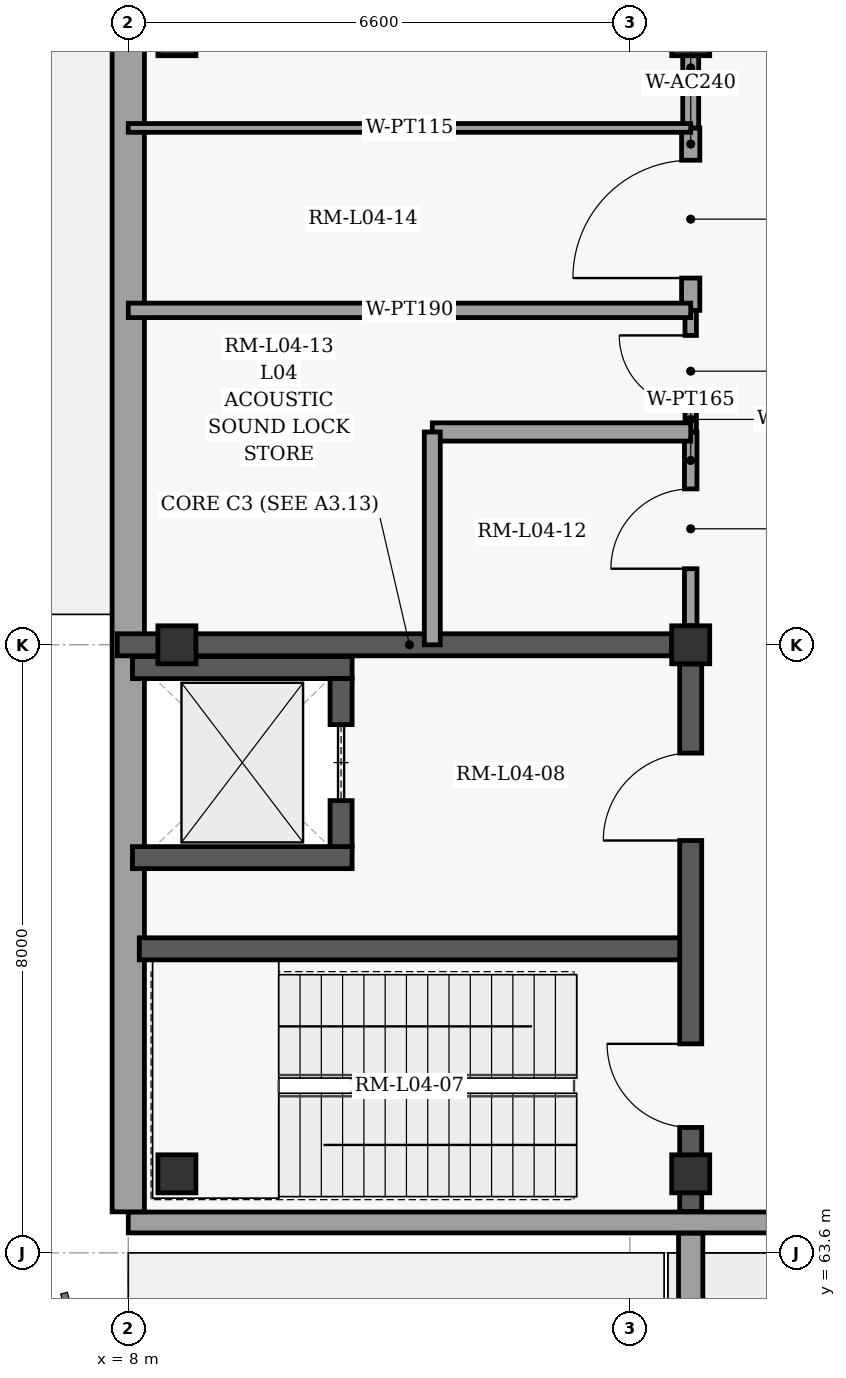
"""IFC4 building model, lengths in metres.
Left out: names, types, materials, properties, quantities, classifications, styles, units other than length and angle.
Written with IfcOpenShell. Run it as: python <this file> out.ifc"""

import sys

from ifc_helpers import new_model, si_unit, direction, frame, frame_2d, origin, origin_2d, place, context, subcontext, project, spatial, rectangle, extrude, element, fill, save


model = new_model("IFC4")
c1 = context("Model", 3, precision=1e-05, world=origin(), true_north=direction((0.0, 1.0)))
c2 = subcontext(c1, "Body", "Model", "MODEL_VIEW")
j1 = project(units=[si_unit("LENGTHUNIT", "METRE"), si_unit("PLANEANGLEUNIT", "RADIAN")], contexts=[c1])
p1 = place(None, origin())
s1 = spatial("IfcSite", under=j1, at=p1, CompositionType="ELEMENT")
p2 = place(p1, origin())
s2 = spatial("IfcBuilding", under=s1, at=p2, CompositionType="ELEMENT")
p3 = place(p2, frame((0.0, 0.0, 20.4)))
s3 = spatial("IfcBuildingStorey", under=s2, at=p3, CompositionType="ELEMENT", Elevation=20.4)
for number, where, z_axis, x_axis in (
    (1, (8.64, 64.64, 0.0), (0.0, 0.0, 1.0), (1.0, 0.0, 0.0)),
    (2, (8.64, 71.6, 0.0), (0.0, 0.0, 1.0), (1.0, 0.0, 0.0)),
    (3, (8.64, 79.6, 0.0), (0.0, 0.0, 1.0), (1.0, 0.0, 0.0)),
    (4, (15.4, 64.64, 0.0), (0.0, 0.0, 1.0), (1.0, 0.0, 0.0)),
    (5, (15.4, 71.6, 0.0), (0.0, 0.0, 1.0), (1.0, 0.0, 0.0)),
    (6, (15.4, 79.6, 0.0), (0.0, 0.0, 1.0), (1.0, 0.0, 0.0)),
):
    element("IfcColumn", number, at=place(p3, frame(where, z_axis=z_axis, x_axis=x_axis)), inside=s3, PredefinedType="COLUMN", context=c2, shape_type="SweptSolid", body=[
        extrude(rectangle(XDim=0.5, YDim=0.5, at=origin_2d()), origin(), (0.0, 0.0, 1.0), 4.5),
    ])
p4 = place(p3, frame((33.6, 64.0, 0.0), z_axis=(0.0, 0.0, 1.0), x_axis=(-1.0, 0.0, 0.0)))
e7 = element("IfcWall", 7, at=p4, inside=s3, PredefinedType="SOLIDWALL", context=c2, shape_type="SweptSolid", body=[
    extrude(rectangle(XDim=25.6, YDim=0.275, at=frame_2d((12.8, 0.0))), origin(), (0.0, 0.0, 1.0), 4.28),
])
p5 = place(p3, frame((8.0, 64.14, 0.0), z_axis=(0.0, 0.0, 1.0), x_axis=(0.0, 1.0, 0.0)))
e8 = element("IfcWall", 8, at=p5, inside=s3, PredefinedType="SOLIDWALL", context=c2, shape_type="SweptSolid", body=[
    extrude(rectangle(XDim=29.72, YDim=0.425, at=frame_2d((14.86, 0.0))), origin(), (0.0, 0.0, 1.0), 4.28),
])
p6 = place(p3, frame((15.4, 60.948, -1.44), z_axis=(0.0, 0.0, 1.0), x_axis=(0.0, 1.0, 0.0)))
e9 = element("IfcWall", 9, at=p6, inside=s3, PredefinedType="SOLIDWALL", context=c2, shape_type="SweptSolid", body=[
    extrude(rectangle(XDim=2.91, YDim=0.32, at=frame_2d((1.455, 0.0))), origin(), (0.0, 0.0, 1.0), 2.08),
])
p7 = place(p3, frame((7.855, 71.6, 0.0), z_axis=(0.0, 0.0, 1.0), x_axis=(1.0, 0.0, 0.0)))
e10 = element("IfcWall", 10, at=p7, inside=s3, PredefinedType="SHEAR", context=c2, shape_type="SweptSolid", body=[
    extrude(rectangle(XDim=7.293, YDim=0.29, at=frame_2d((3.646, 0.0))), origin(), (0.0, 0.0, 1.0), 4.28),
])
p8 = place(p3, frame((15.4, 64.145, 0.0), z_axis=(0.0, 0.0, 1.0), x_axis=(0.0, 1.0, 0.0)))
e11 = element("IfcWall", 11, at=p8, inside=s3, PredefinedType="SHEAR", context=c2, shape_type="SweptSolid", body=[
    extrude(rectangle(XDim=7.203, YDim=0.29, at=frame_2d((3.602, 0.0))), origin(), (0.0, 0.0, 1.0), 4.28),
])
p9 = place(p8, frame((1.105, 0.0, 0.0)))
e12 = element("IfcOpeningElement", 12, at=p9, cuts=e11, PredefinedType="OPENING", context=c2, shape_type="SweptSolid", body=[
    extrude(rectangle(XDim=1.1, YDim=2.15, at=frame_2d((0.55, 1.075))), frame((0.0, 0.155, 0.0), z_axis=(0.0, -1.0, 0.0), x_axis=(1.0, 0.0, 0.0)), (0.0, 0.0, 1.0), 0.31),
])
p10 = place(p8, frame((4.88, 0.0, 0.0)))
e13 = element("IfcOpeningElement", 13, at=p10, cuts=e11, PredefinedType="OPENING", context=c2, shape_type="SweptSolid", body=[
    extrude(rectangle(XDim=1.15, YDim=2.2, at=frame_2d((0.575, 1.1))), frame((0.0, 0.155, 0.0), z_axis=(0.0, -1.0, 0.0), x_axis=(1.0, 0.0, 0.0)), (0.0, 0.0, 1.0), 0.31),
])
p11 = place(p3, frame((8.145, 67.6, 0.0), z_axis=(0.0, 0.0, 1.0), x_axis=(1.0, 0.0, 0.0)))
e14 = element("IfcWall", 14, at=p11, inside=s3, PredefinedType="SHEAR", context=c2, shape_type="SweptSolid", body=[
    extrude(rectangle(XDim=7.11, YDim=0.29, at=frame_2d((3.555, 0.0))), origin(), (0.0, 0.0, 1.0), 4.28),
])
for number, where, z_axis, x_axis in (
    (15, (8.055, 68.8, 0.0), (0.0, 0.0, 1.0), (1.0, 0.0, 0.0)),
    (16, (8.055, 71.3, 0.0), (0.0, 0.0, 1.0), (1.0, 0.0, 0.0)),
):
    element("IfcWall", number, at=place(p3, frame(where, z_axis=z_axis, x_axis=x_axis)), inside=s3, PredefinedType="SHEAR", context=c2, shape_type="SweptSolid", body=[
        extrude(rectangle(XDim=2.89, YDim=0.29, at=frame_2d((1.445, 0.0))), origin(), (0.0, 0.0, 1.0), 4.28),
    ])
p12 = place(p3, frame((10.8, 68.945, 0.0), z_axis=(0.0, 0.0, 1.0), x_axis=(0.0, 1.0, 0.0)))
e17 = element("IfcWall", 17, at=p12, inside=s3, PredefinedType="SHEAR", context=c2, shape_type="SweptSolid", body=[
    extrude(rectangle(XDim=2.21, YDim=0.29, at=frame_2d((1.105, 0.0))), origin(), (0.0, 0.0, 1.0), 4.28),
])
p13 = place(p12, frame((0.605, 0.0, 0.0)))
e18 = element("IfcOpeningElement", 18, at=p13, cuts=e17, PredefinedType="OPENING", context=c2, shape_type="SweptSolid", body=[
    extrude(rectangle(XDim=1.0, YDim=2.15, at=frame_2d((0.5, 1.075))), frame((0.0, 0.155, 0.0), z_axis=(0.0, -1.0, 0.0), x_axis=(1.0, 0.0, 0.0)), (0.0, 0.0, 1.0), 0.31),
])
p14 = place(p3, frame((15.4, 71.852, 0.0), z_axis=(0.0, 0.0, 1.0), x_axis=(0.0, 1.0, 0.0)))
e19 = element("IfcWall", 19, at=p14, inside=s3, PredefinedType="PARTITIONING", context=c2, shape_type="SweptSolid", body=[
    extrude(rectangle(XDim=2.548, YDim=0.165, at=frame_2d((1.274, 0.0))), origin(), (0.0, 0.0, 1.0), 3.43),
])
p15 = place(p14, frame((0.749, 0.0, 0.0)))
e20 = element("IfcOpeningElement", 20, at=p15, cuts=e19, PredefinedType="OPENING", context=c2, shape_type="SweptSolid", body=[
    extrude(rectangle(XDim=1.05, YDim=2.15, at=frame_2d((0.525, 1.075))), frame((0.0, 0.093, 0.0), z_axis=(0.0, -1.0, 0.0), x_axis=(1.0, 0.0, 0.0)), (0.0, 0.0, 1.0), 0.185),
])
p16 = place(p3, frame((15.4, 74.4, 0.0), z_axis=(0.0, 0.0, 1.0), x_axis=(0.0, 1.0, 0.0)))
e21 = element("IfcWall", 21, at=p16, inside=s3, PredefinedType="PARTITIONING", context=c2, shape_type="SweptSolid", body=[
    extrude(rectangle(XDim=1.6, YDim=0.15, at=frame_2d((0.8, 0.0))), origin(), (0.0, 0.0, 1.0), 3.43),
])
p17 = place(p16, frame((0.33, 0.0, 0.0)))
e22 = element("IfcOpeningElement", 22, at=p17, cuts=e21, PredefinedType="OPENING", context=c2, shape_type="SweptSolid", body=[
    extrude(rectangle(XDim=0.94, YDim=2.15, at=frame_2d((0.47, 1.075))), frame((0.0, 0.085, 0.0), z_axis=(0.0, -1.0, 0.0), x_axis=(1.0, 0.0, 0.0)), (0.0, 0.0, 1.0), 0.17),
])
p18 = place(p3, frame((15.4, 76.0, 0.0), z_axis=(0.0, 0.0, 1.0), x_axis=(0.0, 1.0, 0.0)))
e23 = element("IfcWall", 23, at=p18, inside=s3, PredefinedType="PARTITIONING", context=c2, shape_type="SweptSolid", body=[
    extrude(rectangle(XDim=2.4, YDim=0.24, at=frame_2d((1.2, 0.0))), origin(), (0.0, 0.0, 1.0), 3.43),
])
p19 = place(p18, frame((0.425, 0.0, 0.0)))
e24 = element("IfcOpeningElement", 24, at=p19, cuts=e23, PredefinedType="OPENING", context=c2, shape_type="SweptSolid", body=[
    extrude(rectangle(XDim=1.55, YDim=2.25, at=frame_2d((0.775, 1.125))), frame((0.0, 0.13, 0.0), z_axis=(0.0, -1.0, 0.0), x_axis=(1.0, 0.0, 0.0)), (0.0, 0.0, 1.0), 0.26),
])
p20 = place(p3, frame((15.4, 78.4, 0.0), z_axis=(0.0, 0.0, 1.0), x_axis=(0.0, 1.0, 0.0)))
e25 = element("IfcWall", 25, at=p20, inside=s3, PredefinedType="PARTITIONING", context=c2, shape_type="SweptSolid", body=[
    extrude(rectangle(XDim=4.0, YDim=0.21, at=frame_2d((2.0, 0.0))), origin(), (0.0, 0.0, 1.0), 3.43),
])
p21 = place(p20, frame((1.58, 0.0, 0.0)))
e26 = element("IfcOpeningElement", 26, at=p21, cuts=e25, PredefinedType="OPENING", context=c2, shape_type="SweptSolid", body=[
    extrude(rectangle(XDim=1.6, YDim=2.3, at=frame_2d((0.8, 1.15))), frame((0.0, 0.115, 0.0), z_axis=(0.0, -1.0, 0.0), x_axis=(1.0, 0.0, 0.0)), (0.0, 0.0, 1.0), 0.23),
])
p22 = place(p3, frame((12.0, 74.4, 0.0), z_axis=(0.0, 0.0, 1.0), x_axis=(1.0, 0.0, 0.0)))
e27 = element("IfcWall", 27, at=p22, inside=s3, PredefinedType="PARTITIONING", context=c2, shape_type="SweptSolid", body=[
    extrude(rectangle(XDim=3.4, YDim=0.24, at=frame_2d((1.7, 0.0))), origin(), (0.0, 0.0, 1.0), 4.28),
])
p23 = place(p3, frame((12.0, 71.6, 0.0), z_axis=(0.0, 0.0, 1.0), x_axis=(0.0, 1.0, 0.0)))
e28 = element("IfcWall", 28, at=p23, inside=s3, PredefinedType="PARTITIONING", context=c2, shape_type="SweptSolid", body=[
    extrude(rectangle(XDim=2.8, YDim=0.21, at=frame_2d((1.4, 0.0))), origin(), (0.0, 0.0, 1.0), 4.28),
])
p24 = place(p3, frame((8.0, 76.0, 0.0), z_axis=(0.0, 0.0, 1.0), x_axis=(1.0, 0.0, 0.0)))
e29 = element("IfcWall", 29, at=p24, inside=s3, PredefinedType="PARTITIONING", context=c2, shape_type="SweptSolid", body=[
    extrude(rectangle(XDim=7.4, YDim=0.19, at=frame_2d((3.7, 0.0))), origin(), (0.0, 0.0, 1.0), 4.28),
])
p25 = place(p3, frame((8.0, 78.4, 0.0), z_axis=(0.0, 0.0, 1.0), x_axis=(1.0, 0.0, 0.0)))
e30 = element("IfcWall", 30, at=p25, inside=s3, PredefinedType="PARTITIONING", context=c2, shape_type="SweptSolid", body=[
    extrude(rectangle(XDim=7.4, YDim=0.115, at=frame_2d((3.7, 0.0))), origin(), (0.0, 0.0, 1.0), 4.28),
])
p26 = place(p9, origin())
e31 = element("IfcDoor", 31, at=p26, inside=s3, OperationType="SINGLE_SWING_RIGHT", PredefinedType="DOOR", context=c2, shape_type="SweptSolid", body=[
    extrude(rectangle(XDim=1.1, YDim=2.15, at=frame_2d((0.55, 1.075))), frame((0.0, 0.025, 0.0), z_axis=(0.0, -1.0, 0.0), x_axis=(1.0, 0.0, 0.0)), (0.0, 0.0, 1.0), 0.05),
])
fill(e12, e31)
p27 = place(p10, origin())
e32 = element("IfcDoor", 32, at=p27, inside=s3, OperationType="SINGLE_SWING_LEFT", PredefinedType="DOOR", context=c2, shape_type="SweptSolid", body=[
    extrude(rectangle(XDim=1.15, YDim=2.2, at=frame_2d((0.575, 1.1))), frame((0.0, 0.025, 0.0), z_axis=(0.0, -1.0, 0.0), x_axis=(1.0, 0.0, 0.0)), (0.0, 0.0, 1.0), 0.05),
])
fill(e13, e32)
p28 = place(p13, origin())
e33 = element("IfcDoor", 33, at=p28, inside=s3, OperationType="SLIDING_TO_LEFT", PredefinedType="DOOR", context=c2, shape_type="SweptSolid", body=[
    extrude(rectangle(XDim=1.0, YDim=2.15, at=frame_2d((0.5, 1.075))), frame((0.0, 0.025, 0.0), z_axis=(0.0, -1.0, 0.0), x_axis=(1.0, 0.0, 0.0)), (0.0, 0.0, 1.0), 0.05),
])
fill(e18, e33)
p29 = place(p15, origin())
e34 = element("IfcDoor", 34, at=p29, inside=s3, OperationType="SINGLE_SWING_LEFT", PredefinedType="DOOR", context=c2, shape_type="SweptSolid", body=[
    extrude(rectangle(XDim=1.05, YDim=2.15, at=frame_2d((0.525, 1.075))), frame((0.0, 0.025, 0.0), z_axis=(0.0, -1.0, 0.0), x_axis=(1.0, 0.0, 0.0)), (0.0, 0.0, 1.0), 0.05),
])
fill(e20, e34)
p30 = place(p17, origin())
e35 = element("IfcDoor", 35, at=p30, inside=s3, OperationType="SINGLE_SWING_RIGHT", PredefinedType="DOOR", context=c2, shape_type="SweptSolid", body=[
    extrude(rectangle(XDim=0.94, YDim=2.15, at=frame_2d((0.47, 1.075))), frame((0.0, 0.025, 0.0), z_axis=(0.0, -1.0, 0.0), x_axis=(1.0, 0.0, 0.0)), (0.0, 0.0, 1.0), 0.05),
])
fill(e22, e35)
p31 = place(p19, origin())
e36 = element("IfcDoor", 36, at=p31, inside=s3, OperationType="SINGLE_SWING_LEFT", PredefinedType="DOOR", context=c2, shape_type="SweptSolid", body=[
    extrude(rectangle(XDim=1.55, YDim=2.25, at=frame_2d((0.775, 1.125))), frame((0.0, 0.025, 0.0), z_axis=(0.0, -1.0, 0.0), x_axis=(1.0, 0.0, 0.0)), (0.0, 0.0, 1.0), 0.05),
])
fill(e24, e36)
save(model, sys.argv[1])
